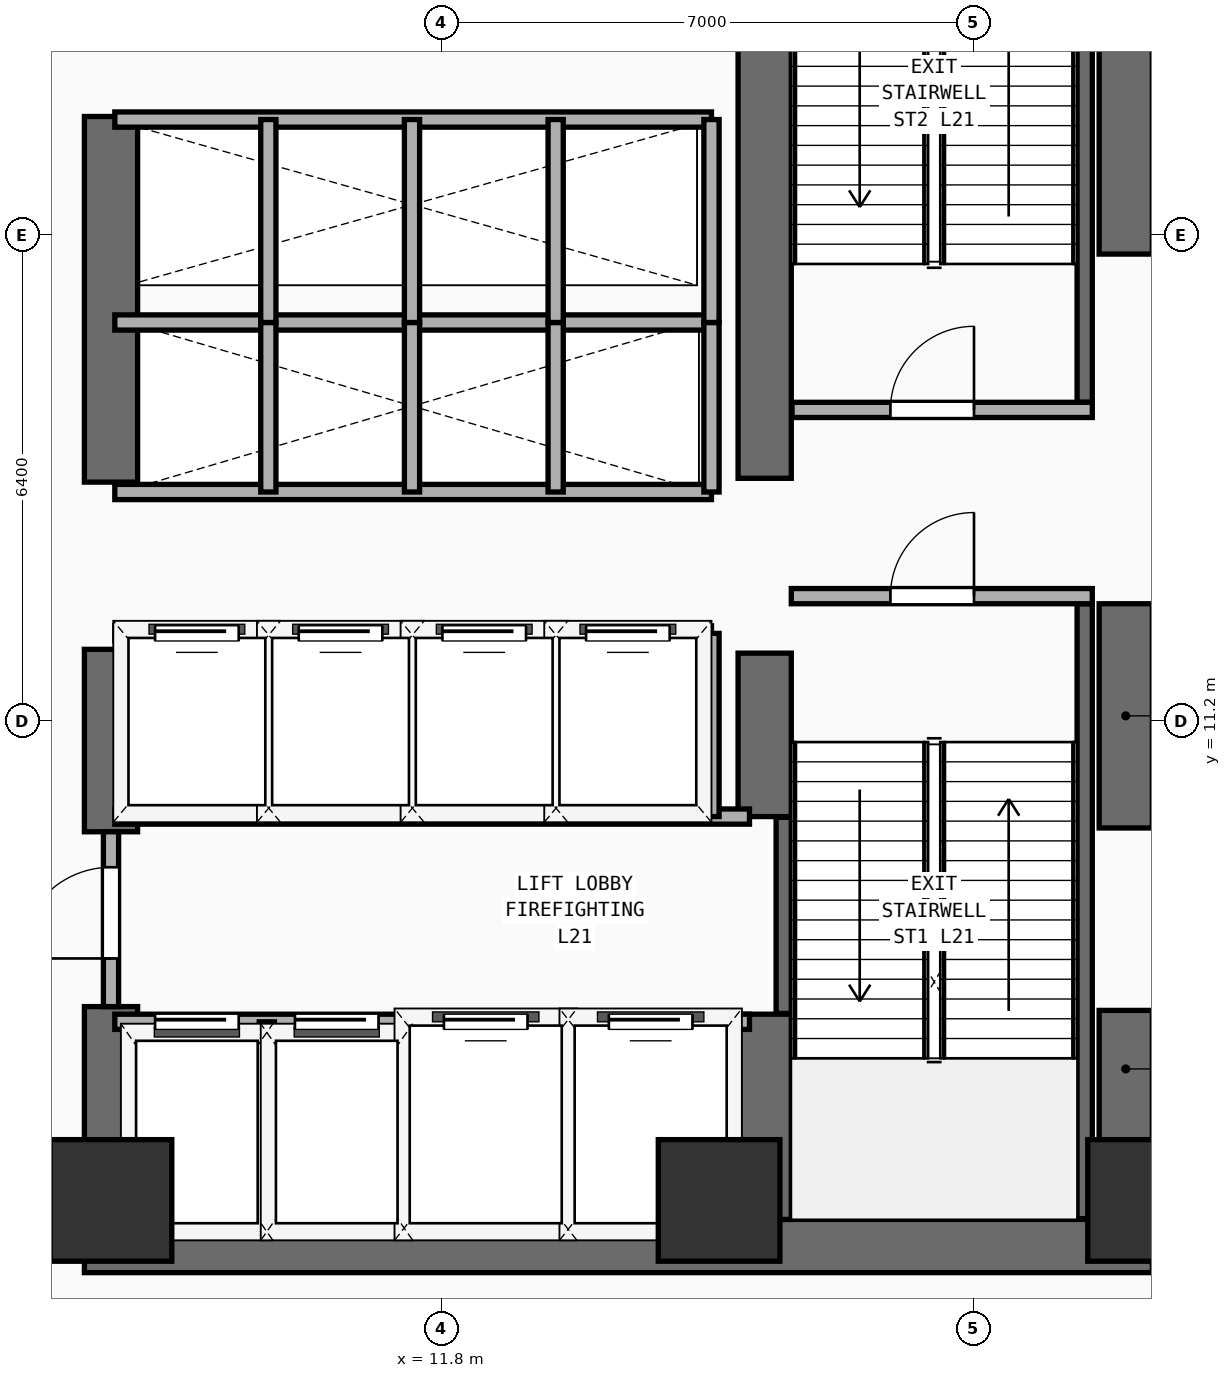
"""IFC4 building model, lengths in metres.
Left out: names, types, materials, properties, quantities, classifications, styles, units other than length and angle.
Written with IfcOpenShell. Run it as: python <this file> out.ifc"""

import sys

from ifc_helpers import new_model, si_unit, direction, frame, frame_2d, origin, origin_2d, place, context, subcontext, project, spatial, rectangle, extrude, element, fill, save


model = new_model("IFC4")
c1 = context("Model", 3, precision=1e-05, world=origin(), true_north=direction((0.0, 1.0)))
c2 = subcontext(c1, "Body", "Model", "MODEL_VIEW")
j1 = project(units=[si_unit("LENGTHUNIT", "METRE"), si_unit("PLANEANGLEUNIT", "RADIAN")], contexts=[c1])
p1 = place(None, origin())
s1 = spatial("IfcSite", under=j1, at=p1, CompositionType="ELEMENT")
p2 = place(p1, origin())
s2 = spatial("IfcBuilding", under=s1, at=p2, CompositionType="ELEMENT")
p3 = place(p2, frame((0.0, 0.0, 82.8)))
s3 = spatial("IfcBuildingStorey", under=s2, at=p3, CompositionType="ELEMENT", Elevation=82.8)
p4 = place(p3, frame((7.1, 4.3, 0.0), z_axis=(0.0, 0.0, 1.0), x_axis=(1.0, 0.0, 0.0)))
e1 = element("IfcWall", 1, at=p4, inside=s3, PredefinedType="SHEAR", context=c2, shape_type="SweptSolid", body=[
    extrude(rectangle(XDim=14.05, YDim=0.7, at=frame_2d((7.025, 0.0))), origin(), (0.0, 0.0, 1.0), 4.84),
])
p5 = place(p3, frame((7.45, 4.65, 0.0), z_axis=(0.0, 0.0, 1.0), x_axis=(0.0, 1.0, 0.0)))
e2 = element("IfcWall", 2, at=p5, inside=s3, PredefinedType="SHEAR", context=c2, shape_type="SweptSolid", body=[
    extrude(rectangle(XDim=2.8, YDim=0.7, at=frame_2d((1.4, 0.0))), origin(), (0.0, 0.0, 1.0), 4.84),
])
p6 = place(p3, frame((7.45, 9.75, 0.0), z_axis=(0.0, 0.0, 1.0), x_axis=(0.0, 1.0, 0.0)))
e3 = element("IfcWall", 3, at=p6, inside=s3, PredefinedType="SHEAR", context=c2, shape_type="SweptSolid", body=[
    extrude(rectangle(XDim=2.4, YDim=0.7, at=frame_2d((1.2, 0.0))), origin(), (0.0, 0.0, 1.0), 4.84),
])
p7 = place(p3, frame((7.45, 14.35, 0.0), z_axis=(0.0, 0.0, 1.0), x_axis=(0.0, 1.0, 0.0)))
e4 = element("IfcWall", 4, at=p7, inside=s3, PredefinedType="SHEAR", context=c2, shape_type="SweptSolid", body=[
    extrude(rectangle(XDim=4.81, YDim=0.7, at=frame_2d((2.405, 0.0))), origin(), (0.0, 0.0, 1.0), 4.84),
])
p8 = place(p3, frame((20.8, 4.65, 0.0), z_axis=(0.0, 0.0, 1.0), x_axis=(0.0, 1.0, 0.0)))
e5 = element("IfcWall", 5, at=p8, inside=s3, PredefinedType="SHEAR", context=c2, shape_type="SweptSolid", body=[
    extrude(rectangle(XDim=2.75, YDim=0.7, at=frame_2d((1.375, 0.0))), origin(), (0.0, 0.0, 1.0), 4.84),
])
p9 = place(p3, frame((20.8, 9.8, 0.0), z_axis=(0.0, 0.0, 1.0), x_axis=(0.0, 1.0, 0.0)))
e6 = element("IfcWall", 6, at=p9, inside=s3, PredefinedType="SHEAR", context=c2, shape_type="SweptSolid", body=[
    extrude(rectangle(XDim=2.95, YDim=0.7, at=frame_2d((1.475, 0.0))), origin(), (0.0, 0.0, 1.0), 4.84),
])
p10 = place(p3, frame((20.8, 17.35, 0.0), z_axis=(0.0, 0.0, 1.0), x_axis=(0.0, 1.0, 0.0)))
e7 = element("IfcWall", 7, at=p10, inside=s3, PredefinedType="SHEAR", context=c2, shape_type="SweptSolid", body=[
    extrude(rectangle(XDim=6.15, YDim=0.7, at=frame_2d((3.075, 0.0))), origin(), (0.0, 0.0, 1.0), 4.84),
])
p11 = place(p3, frame((16.05, 4.65, 0.0), z_axis=(0.0, 0.0, 1.0), x_axis=(0.0, 1.0, 0.0)))
e8 = element("IfcWall", 8, at=p11, inside=s3, PredefinedType="SHEAR", context=c2, shape_type="SweptSolid", body=[
    extrude(rectangle(XDim=2.7, YDim=0.7, at=frame_2d((1.35, 0.0))), origin(), (0.0, 0.0, 1.0), 4.84),
])
p12 = place(p3, frame((16.05, 9.95, 0.0), z_axis=(0.0, 0.0, 1.0), x_axis=(0.0, 1.0, 0.0)))
e9 = element("IfcWall", 9, at=p12, inside=s3, PredefinedType="SHEAR", context=c2, shape_type="SweptSolid", body=[
    extrude(rectangle(XDim=2.15, YDim=0.7, at=frame_2d((1.075, 0.0))), origin(), (0.0, 0.0, 1.0), 4.84),
])
p13 = place(p3, frame((16.05, 14.4, 0.0), z_axis=(0.0, 0.0, 1.0), x_axis=(0.0, 1.0, 0.0)))
e10 = element("IfcWall", 10, at=p13, inside=s3, PredefinedType="SHEAR", context=c2, shape_type="SweptSolid", body=[
    extrude(rectangle(XDim=9.1, YDim=0.7, at=frame_2d((4.55, 0.0))), origin(), (0.0, 0.0, 1.0), 4.84),
])
for number, where, z_axis, x_axis in (
    (11, (7.45, 4.9, 0.0), (0.0, 0.0, 1.0), (1.0, 0.0, 0.0)),
    (12, (15.45, 4.9, 0.0), (0.0, 0.0, 1.0), (1.0, 0.0, 0.0)),
    (13, (21.1, 4.9, 0.0), (0.0, 0.0, 1.0), (1.0, 0.0, 0.0)),
):
    element("IfcColumn", number, at=place(p3, frame(where, z_axis=z_axis, x_axis=x_axis)), inside=s3, PredefinedType="COLUMN", context=c2, shape_type="SweptSolid", body=[
        extrude(rectangle(XDim=1.6, YDim=1.6, at=origin_2d()), origin(), (0.0, 0.0, 1.0), 4.84),
    ])
p14 = place(p3, frame((16.3, 7.36, 0.0), z_axis=(0.0, 0.0, 1.0), x_axis=(0.0, 1.0, 0.0)))
e14 = element("IfcWall", 14, at=p14, inside=s3, PredefinedType="SHEAR", context=c2, shape_type="SweptSolid", body=[
    extrude(rectangle(XDim=2.58, YDim=0.2, at=frame_2d((1.29, 0.0))), origin(), (0.0, 0.0, 1.0), 4.84),
])
p15 = place(p3, frame((20.26, 4.66, 0.0), z_axis=(0.0, 0.0, 1.0), x_axis=(0.0, 1.0, 0.0)))
e15 = element("IfcWall", 15, at=p15, inside=s3, PredefinedType="SHEAR", context=c2, shape_type="SweptSolid", body=[
    extrude(rectangle(XDim=8.09, YDim=0.2, at=frame_2d((4.045, 0.0))), origin(), (0.0, 0.0, 1.0), 4.84),
])
p16 = place(p3, frame((16.4, 12.85, 0.0), z_axis=(0.0, 0.0, 1.0), x_axis=(1.0, 0.0, 0.0)))
e16 = element("IfcWall", 16, at=p16, inside=s3, PredefinedType="PARTITIONING", context=c2, shape_type="SweptSolid", body=[
    extrude(rectangle(XDim=3.96, YDim=0.2, at=frame_2d((1.98, 0.0))), origin(), (0.0, 0.0, 1.0), 4.84),
])
p17 = place(p16, frame((1.304, 0.0, 0.0)))
e17 = element("IfcOpeningElement", 17, at=p17, cuts=e16, PredefinedType="OPENING", context=c2, shape_type="SweptSolid", body=[
    extrude(rectangle(XDim=1.1, YDim=2.2, at=frame_2d((0.55, 1.1))), frame((0.0, 0.11, 0.0), z_axis=(0.0, -1.0, 0.0), x_axis=(1.0, 0.0, 0.0)), (0.0, 0.0, 1.0), 0.22),
])
p18 = place(p3, frame((20.26, 15.4, 0.0), z_axis=(0.0, 0.0, 1.0), x_axis=(0.0, 1.0, 0.0)))
e18 = element("IfcWall", 18, at=p18, inside=s3, PredefinedType="SHEAR", context=c2, shape_type="SweptSolid", body=[
    extrude(rectangle(XDim=8.09, YDim=0.2, at=frame_2d((4.045, 0.0))), origin(), (0.0, 0.0, 1.0), 4.84),
])
p19 = place(p3, frame((16.41, 15.3, 0.0), z_axis=(0.0, 0.0, 1.0), x_axis=(1.0, 0.0, 0.0)))
e19 = element("IfcWall", 19, at=p19, inside=s3, PredefinedType="PARTITIONING", context=c2, shape_type="SweptSolid", body=[
    extrude(rectangle(XDim=3.95, YDim=0.2, at=frame_2d((1.975, 0.0))), origin(), (0.0, 0.0, 1.0), 4.84),
])
p20 = place(p19, frame((1.294, 0.0, 0.0)))
e20 = element("IfcOpeningElement", 20, at=p20, cuts=e19, PredefinedType="OPENING", context=c2, shape_type="SweptSolid", body=[
    extrude(rectangle(XDim=1.1, YDim=2.2, at=frame_2d((0.55, 1.1))), frame((0.0, 0.11, 0.0), z_axis=(0.0, -1.0, 0.0), x_axis=(1.0, 0.0, 0.0)), (0.0, 0.0, 1.0), 0.22),
])
p21 = place(p3, frame((7.5, 7.25, 0.0), z_axis=(0.0, 0.0, 1.0), x_axis=(1.0, 0.0, 0.0)))
e21 = element("IfcWall", 21, at=p21, inside=s3, PredefinedType="PARTITIONING", context=c2, shape_type="SweptSolid", body=[
    extrude(rectangle(XDim=8.35, YDim=0.2, at=frame_2d((4.175, 0.0))), origin(), (0.0, 0.0, 1.0), 4.84),
])
p22 = place(p21, frame((0.53, 0.0, 0.0)))
e22 = element("IfcOpeningElement", 22, at=p22, cuts=e21, PredefinedType="OPENING", context=c2, shape_type="SweptSolid", body=[
    extrude(rectangle(XDim=1.1, YDim=2.2, at=frame_2d((0.55, 1.1))), frame((0.0, 0.11, 0.0), z_axis=(0.0, -1.0, 0.0), x_axis=(1.0, 0.0, 0.0)), (0.0, 0.0, 1.0), 0.22),
])
p23 = place(p21, frame((2.37, 0.0, 0.0)))
e23 = element("IfcOpeningElement", 23, at=p23, cuts=e21, PredefinedType="OPENING", context=c2, shape_type="SweptSolid", body=[
    extrude(rectangle(XDim=1.1, YDim=2.2, at=frame_2d((0.55, 1.1))), frame((0.0, 0.11, 0.0), z_axis=(0.0, -1.0, 0.0), x_axis=(1.0, 0.0, 0.0)), (0.0, 0.0, 1.0), 0.22),
])
p24 = place(p21, frame((4.33, 0.0, 0.0)))
e24 = element("IfcOpeningElement", 24, at=p24, cuts=e21, PredefinedType="OPENING", context=c2, shape_type="SweptSolid", body=[
    extrude(rectangle(XDim=1.1, YDim=2.2, at=frame_2d((0.55, 1.1))), frame((0.0, 0.11, 0.0), z_axis=(0.0, -1.0, 0.0), x_axis=(1.0, 0.0, 0.0)), (0.0, 0.0, 1.0), 0.22),
])
p25 = place(p21, frame((6.5, 0.0, 0.0)))
e25 = element("IfcOpeningElement", 25, at=p25, cuts=e21, PredefinedType="OPENING", context=c2, shape_type="SweptSolid", body=[
    extrude(rectangle(XDim=1.1, YDim=2.2, at=frame_2d((0.55, 1.1))), frame((0.0, 0.11, 0.0), z_axis=(0.0, -1.0, 0.0), x_axis=(1.0, 0.0, 0.0)), (0.0, 0.0, 1.0), 0.22),
])
p26 = place(p3, frame((7.5, 9.95, 0.0), z_axis=(0.0, 0.0, 1.0), x_axis=(1.0, 0.0, 0.0)))
e26 = element("IfcWall", 26, at=p26, inside=s3, PredefinedType="PARTITIONING", context=c2, shape_type="SweptSolid", body=[
    extrude(rectangle(XDim=8.35, YDim=0.2, at=frame_2d((4.175, 0.0))), origin(), (0.0, 0.0, 1.0), 4.84),
])
for number, where, z_axis, x_axis in (
    (27, (9.5, 4.45, 0.0), (0.0, 0.0, 1.0), (0.0, 1.0, 0.0)),
    (28, (11.36, 4.45, 0.0), (0.0, 0.0, 1.0), (0.0, 1.0, 0.0)),
    (29, (13.46, 4.45, 0.0), (0.0, 0.0, 1.0), (0.0, 1.0, 0.0)),
):
    element("IfcWall", number, at=place(p3, frame(where, z_axis=z_axis, x_axis=x_axis)), inside=s3, PredefinedType="PARTITIONING", context=c2, shape_type="SweptSolid", body=[
        extrude(rectangle(XDim=2.8, YDim=0.2, at=frame_2d((1.4, 0.0))), origin(), (0.0, 0.0, 1.0), 4.84),
    ])
p27 = place(p3, frame((7.45, 7.45, 0.0), z_axis=(0.0, 0.0, 1.0), x_axis=(0.0, 1.0, 0.0)))
e30 = element("IfcWall", 30, at=p27, inside=s3, PredefinedType="PARTITIONING", context=c2, shape_type="SweptSolid", body=[
    extrude(rectangle(XDim=2.3, YDim=0.2, at=frame_2d((1.15, 0.0))), origin(), (0.0, 0.0, 1.0), 3.62),
])
p28 = place(p27, frame((0.633, 0.0, 0.0)))
e31 = element("IfcOpeningElement", 31, at=p28, cuts=e30, PredefinedType="OPENING", context=c2, shape_type="SweptSolid", body=[
    extrude(rectangle(XDim=1.2, YDim=2.25, at=frame_2d((0.6, 1.125))), frame((0.0, 0.11, 0.0), z_axis=(0.0, -1.0, 0.0), x_axis=(1.0, 0.0, 0.0)), (0.0, 0.0, 1.0), 0.22),
])
p29 = place(p3, frame((7.5, 12.36, 0.0), z_axis=(0.0, 0.0, 1.0), x_axis=(1.0, 0.0, 0.0)))
e32 = element("IfcWall", 32, at=p29, inside=s3, PredefinedType="PARTITIONING", context=c2, shape_type="SweptSolid", body=[
    extrude(rectangle(XDim=7.85, YDim=0.2, at=frame_2d((3.925, 0.0))), origin(), (0.0, 0.0, 1.0), 4.84),
])
p30 = place(p29, frame((0.53, 0.0, 0.0)))
e33 = element("IfcOpeningElement", 33, at=p30, cuts=e32, PredefinedType="OPENING", context=c2, shape_type="SweptSolid", body=[
    extrude(rectangle(XDim=1.1, YDim=2.2, at=frame_2d((0.55, 1.1))), frame((0.0, 0.11, 0.0), z_axis=(0.0, -1.0, 0.0), x_axis=(1.0, 0.0, 0.0)), (0.0, 0.0, 1.0), 0.22),
])
p31 = place(p29, frame((2.42, 0.0, 0.0)))
e34 = element("IfcOpeningElement", 34, at=p31, cuts=e32, PredefinedType="OPENING", context=c2, shape_type="SweptSolid", body=[
    extrude(rectangle(XDim=1.1, YDim=2.2, at=frame_2d((0.55, 1.1))), frame((0.0, 0.11, 0.0), z_axis=(0.0, -1.0, 0.0), x_axis=(1.0, 0.0, 0.0)), (0.0, 0.0, 1.0), 0.22),
])
p32 = place(p29, frame((4.31, 0.0, 0.0)))
e35 = element("IfcOpeningElement", 35, at=p32, cuts=e32, PredefinedType="OPENING", context=c2, shape_type="SweptSolid", body=[
    extrude(rectangle(XDim=1.1, YDim=2.2, at=frame_2d((0.55, 1.1))), frame((0.0, 0.11, 0.0), z_axis=(0.0, -1.0, 0.0), x_axis=(1.0, 0.0, 0.0)), (0.0, 0.0, 1.0), 0.22),
])
p33 = place(p29, frame((6.2, 0.0, 0.0)))
e36 = element("IfcOpeningElement", 36, at=p33, cuts=e32, PredefinedType="OPENING", context=c2, shape_type="SweptSolid", body=[
    extrude(rectangle(XDim=1.1, YDim=2.2, at=frame_2d((0.55, 1.1))), frame((0.0, 0.11, 0.0), z_axis=(0.0, -1.0, 0.0), x_axis=(1.0, 0.0, 0.0)), (0.0, 0.0, 1.0), 0.22),
])
for number, where, z_axis, x_axis in (
    (37, (15.35, 9.95, 0.0), (0.0, 0.0, 1.0), (0.0, 1.0, 0.0)),
    (38, (9.52, 9.95, 0.0), (0.0, 0.0, 1.0), (0.0, 1.0, 0.0)),
    (39, (11.41, 9.95, 0.0), (0.0, 0.0, 1.0), (0.0, 1.0, 0.0)),
    (40, (13.3, 9.95, 0.0), (0.0, 0.0, 1.0), (0.0, 1.0, 0.0)),
):
    element("IfcWall", number, at=place(p3, frame(where, z_axis=z_axis, x_axis=x_axis)), inside=s3, PredefinedType="PARTITIONING", context=c2, shape_type="SweptSolid", body=[
        extrude(rectangle(XDim=2.41, YDim=0.2, at=frame_2d((1.205, 0.0))), origin(), (0.0, 0.0, 1.0), 4.84),
    ])
for number, where, z_axis, x_axis in (
    (41, (7.5, 14.22, 0.0), (0.0, 0.0, 1.0), (1.0, 0.0, 0.0)),
    (42, (7.5, 16.45, 0.0), (0.0, 0.0, 1.0), (1.0, 0.0, 0.0)),
):
    element("IfcWall", number, at=place(p3, frame(where, z_axis=z_axis, x_axis=x_axis)), inside=s3, PredefinedType="PARTITIONING", context=c2, shape_type="SweptSolid", body=[
        extrude(rectangle(XDim=7.85, YDim=0.2, at=frame_2d((3.925, 0.0))), origin(), (0.0, 0.0, 1.0), 4.84),
    ])
for number, where, z_axis, x_axis in (
    (43, (15.35, 14.22, 0.0), (0.0, 0.0, 1.0), (0.0, 1.0, 0.0)),
    (44, (9.52, 14.22, 0.0), (0.0, 0.0, 1.0), (0.0, 1.0, 0.0)),
    (45, (11.41, 14.22, 0.0), (0.0, 0.0, 1.0), (0.0, 1.0, 0.0)),
    (46, (13.3, 14.22, 0.0), (0.0, 0.0, 1.0), (0.0, 1.0, 0.0)),
):
    element("IfcWall", number, at=place(p3, frame(where, z_axis=z_axis, x_axis=x_axis)), inside=s3, PredefinedType="PARTITIONING", context=c2, shape_type="SweptSolid", body=[
        extrude(rectangle(XDim=2.23, YDim=0.2, at=frame_2d((1.115, 0.0))), origin(), (0.0, 0.0, 1.0), 4.84),
    ])
p34 = place(p3, frame((7.5, 19.12, 0.0), z_axis=(0.0, 0.0, 1.0), x_axis=(1.0, 0.0, 0.0)))
e47 = element("IfcWall", 47, at=p34, inside=s3, PredefinedType="PARTITIONING", context=c2, shape_type="SweptSolid", body=[
    extrude(rectangle(XDim=7.85, YDim=0.2, at=frame_2d((3.925, 0.0))), origin(), (0.0, 0.0, 1.0), 4.84),
])
for number, where, z_axis, x_axis in (
    (48, (15.35, 16.45, 0.0), (0.0, 0.0, 1.0), (0.0, 1.0, 0.0)),
    (49, (9.52, 16.45, 0.0), (0.0, 0.0, 1.0), (0.0, 1.0, 0.0)),
    (50, (11.41, 16.45, 0.0), (0.0, 0.0, 1.0), (0.0, 1.0, 0.0)),
    (51, (13.3, 16.45, 0.0), (0.0, 0.0, 1.0), (0.0, 1.0, 0.0)),
):
    element("IfcWall", number, at=place(p3, frame(where, z_axis=z_axis, x_axis=x_axis)), inside=s3, PredefinedType="PARTITIONING", context=c2, shape_type="SweptSolid", body=[
        extrude(rectangle(XDim=2.67, YDim=0.2, at=frame_2d((1.335, 0.0))), origin(), (0.0, 0.0, 1.0), 4.84),
    ])
p35 = place(p17, frame((1.1, 0.0, 0.0), z_axis=(0.0, 0.0, 1.0), x_axis=(-1.0, 0.0, 0.0)))
e52 = element("IfcDoor", 52, at=p35, inside=s3, OperationType="SINGLE_SWING_LEFT", PredefinedType="DOOR", context=c2, shape_type="SweptSolid", body=[
    extrude(rectangle(XDim=1.1, YDim=2.2, at=frame_2d((0.55, 1.1))), frame((0.0, 0.025, 0.0), z_axis=(0.0, -1.0, 0.0), x_axis=(1.0, 0.0, 0.0)), (0.0, 0.0, 1.0), 0.05),
])
fill(e17, e52)
p36 = place(p20, origin())
e53 = element("IfcDoor", 53, at=p36, inside=s3, OperationType="SINGLE_SWING_RIGHT", PredefinedType="DOOR", context=c2, shape_type="SweptSolid", body=[
    extrude(rectangle(XDim=1.1, YDim=2.2, at=frame_2d((0.55, 1.1))), frame((0.0, 0.025, 0.0), z_axis=(0.0, -1.0, 0.0), x_axis=(1.0, 0.0, 0.0)), (0.0, 0.0, 1.0), 0.05),
])
fill(e20, e53)
p37 = place(p22, origin())
e54 = element("IfcDoor", 54, at=p37, inside=s3, OperationType="SLIDING_TO_LEFT", PredefinedType="DOOR", context=c2, shape_type="SweptSolid", body=[
    extrude(rectangle(XDim=1.1, YDim=2.2, at=frame_2d((0.55, 1.1))), frame((0.0, 0.025, 0.0), z_axis=(0.0, -1.0, 0.0), x_axis=(1.0, 0.0, 0.0)), (0.0, 0.0, 1.0), 0.05),
])
fill(e22, e54)
p38 = place(p23, origin())
e55 = element("IfcDoor", 55, at=p38, inside=s3, OperationType="SLIDING_TO_LEFT", PredefinedType="DOOR", context=c2, shape_type="SweptSolid", body=[
    extrude(rectangle(XDim=1.1, YDim=2.2, at=frame_2d((0.55, 1.1))), frame((0.0, 0.025, 0.0), z_axis=(0.0, -1.0, 0.0), x_axis=(1.0, 0.0, 0.0)), (0.0, 0.0, 1.0), 0.05),
])
fill(e23, e55)
p39 = place(p24, origin())
e56 = element("IfcDoor", 56, at=p39, inside=s3, OperationType="SLIDING_TO_LEFT", PredefinedType="DOOR", context=c2, shape_type="SweptSolid", body=[
    extrude(rectangle(XDim=1.1, YDim=2.2, at=frame_2d((0.55, 1.1))), frame((0.0, 0.025, 0.0), z_axis=(0.0, -1.0, 0.0), x_axis=(1.0, 0.0, 0.0)), (0.0, 0.0, 1.0), 0.05),
])
fill(e24, e56)
p40 = place(p25, origin())
e57 = element("IfcDoor", 57, at=p40, inside=s3, OperationType="SLIDING_TO_LEFT", PredefinedType="DOOR", context=c2, shape_type="SweptSolid", body=[
    extrude(rectangle(XDim=1.1, YDim=2.2, at=frame_2d((0.55, 1.1))), frame((0.0, 0.025, 0.0), z_axis=(0.0, -1.0, 0.0), x_axis=(1.0, 0.0, 0.0)), (0.0, 0.0, 1.0), 0.05),
])
fill(e25, e57)
p41 = place(p28, frame((1.2, 0.0, 0.0), z_axis=(0.0, 0.0, 1.0), x_axis=(-1.0, 0.0, 0.0)))
e58 = element("IfcDoor", 58, at=p41, inside=s3, OperationType="SINGLE_SWING_RIGHT", PredefinedType="DOOR", context=c2, shape_type="SweptSolid", body=[
    extrude(rectangle(XDim=1.2, YDim=2.25, at=frame_2d((0.6, 1.125))), frame((0.0, 0.025, 0.0), z_axis=(0.0, -1.0, 0.0), x_axis=(1.0, 0.0, 0.0)), (0.0, 0.0, 1.0), 0.05),
])
fill(e31, e58)
p42 = place(p30, origin())
e59 = element("IfcDoor", 59, at=p42, inside=s3, OperationType="SLIDING_TO_LEFT", PredefinedType="DOOR", context=c2, shape_type="SweptSolid", body=[
    extrude(rectangle(XDim=1.1, YDim=2.2, at=frame_2d((0.55, 1.1))), frame((0.0, 0.025, 0.0), z_axis=(0.0, -1.0, 0.0), x_axis=(1.0, 0.0, 0.0)), (0.0, 0.0, 1.0), 0.05),
])
fill(e33, e59)
p43 = place(p31, origin())
e60 = element("IfcDoor", 60, at=p43, inside=s3, OperationType="SLIDING_TO_LEFT", PredefinedType="DOOR", context=c2, shape_type="SweptSolid", body=[
    extrude(rectangle(XDim=1.1, YDim=2.2, at=frame_2d((0.55, 1.1))), frame((0.0, 0.025, 0.0), z_axis=(0.0, -1.0, 0.0), x_axis=(1.0, 0.0, 0.0)), (0.0, 0.0, 1.0), 0.05),
])
fill(e34, e60)
p44 = place(p32, origin())
e61 = element("IfcDoor", 61, at=p44, inside=s3, OperationType="SLIDING_TO_LEFT", PredefinedType="DOOR", context=c2, shape_type="SweptSolid", body=[
    extrude(rectangle(XDim=1.1, YDim=2.2, at=frame_2d((0.55, 1.1))), frame((0.0, 0.025, 0.0), z_axis=(0.0, -1.0, 0.0), x_axis=(1.0, 0.0, 0.0)), (0.0, 0.0, 1.0), 0.05),
])
fill(e35, e61)
p45 = place(p33, origin())
e62 = element("IfcDoor", 62, at=p45, inside=s3, OperationType="SLIDING_TO_LEFT", PredefinedType="DOOR", context=c2, shape_type="SweptSolid", body=[
    extrude(rectangle(XDim=1.1, YDim=2.2, at=frame_2d((0.55, 1.1))), frame((0.0, 0.025, 0.0), z_axis=(0.0, -1.0, 0.0), x_axis=(1.0, 0.0, 0.0)), (0.0, 0.0, 1.0), 0.05),
])
fill(e36, e62)
save(model, sys.argv[1])
